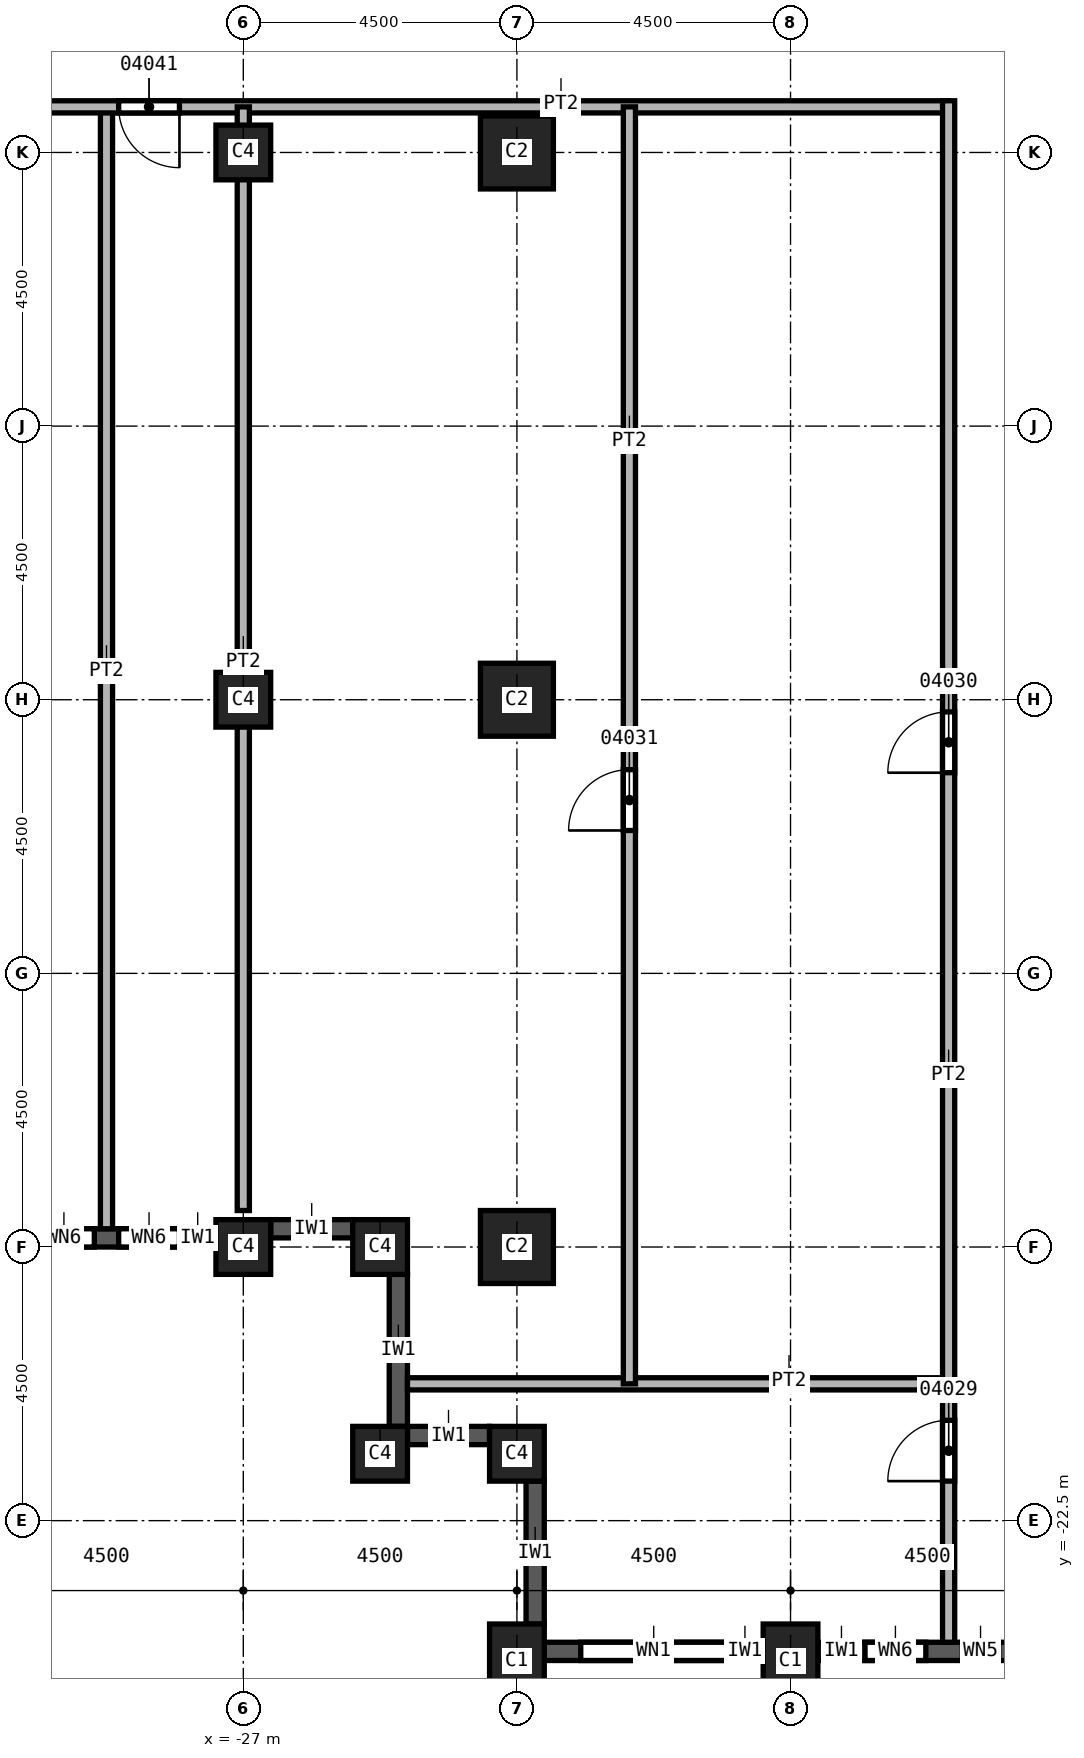
"""IFC4 building model, lengths in metres.
Left out: names, types, materials, properties, quantities, classifications, styles, units other than length and angle.
Written with IfcOpenShell. Run it as: python <this file> out.ifc"""

import sys

from ifc_helpers import new_model, si_unit, direction, frame, frame_2d, origin, origin_2d, place, context, subcontext, project, spatial, rectangle, extrude, element, fill, save


model = new_model("IFC4")
c1 = context("Model", 3, precision=1e-05, world=origin(), true_north=direction((0.0, 1.0)))
c2 = subcontext(c1, "Body", "Model", "MODEL_VIEW")
j1 = project(units=[si_unit("LENGTHUNIT", "METRE"), si_unit("PLANEANGLEUNIT", "RADIAN")], contexts=[c1])
p1 = place(None, origin())
s1 = spatial("IfcSite", under=j1, at=p1, CompositionType="ELEMENT")
p2 = place(p1, origin())
s2 = spatial("IfcBuilding", under=s1, at=p2, CompositionType="ELEMENT")
p3 = place(p2, frame((0.0, 0.0, 104.0)))
s3 = spatial("IfcBuildingStorey", under=s2, at=p3, CompositionType="ELEMENT", Elevation=104.0)
for number, where, z_axis, x_axis in (
    (1, (-22.5, 0.0, 0.0), (0.0, 0.0, 1.0), (1.0, 0.0, 0.0)),
    (2, (-22.5, -9.0, 0.0), (0.0, 0.0, 1.0), (1.0, 0.0, 0.0)),
    (3, (-22.5, -18.0, 0.0), (0.0, 0.0, 1.0), (1.0, 0.0, 0.0)),
):
    element("IfcColumn", number, at=place(p3, frame(where, z_axis=z_axis, x_axis=x_axis)), inside=s3, PredefinedType="COLUMN", context=c2, shape_type="SweptSolid", body=[
        extrude(rectangle(XDim=1.2, YDim=1.2, at=origin_2d()), origin(), (0.0, 0.0, 1.0), 3.7),
    ])
for number, where, z_axis, x_axis in (
    (4, (-18.0, -24.8, 0.0), (0.0, 0.0, 1.0), (1.0, 0.0, 0.0)),
    (5, (-22.5, -24.8, 0.0), (0.0, 0.0, 1.0), (1.0, 0.0, 0.0)),
):
    element("IfcColumn", number, at=place(p3, frame(where, z_axis=z_axis, x_axis=x_axis)), inside=s3, PredefinedType="COLUMN", context=c2, shape_type="SweptSolid", body=[
        extrude(rectangle(XDim=0.9, YDim=1.2, at=origin_2d()), origin(), (0.0, 0.0, 1.0), 3.7),
    ])
for number, where, z_axis, x_axis in (
    (6, (-27.0, 0.0, 0.0), (0.0, 0.0, 1.0), (1.0, 0.0, 0.0)),
    (7, (-27.0, -9.0, 0.0), (0.0, 0.0, 1.0), (1.0, 0.0, 0.0)),
    (8, (-27.0, -18.0, 0.0), (0.0, 0.0, 1.0), (1.0, 0.0, 0.0)),
    (9, (-22.5, -21.4, 0.0), (0.0, 0.0, 1.0), (1.0, 0.0, 0.0)),
    (10, (-24.75, -21.4, 0.0), (0.0, 0.0, 1.0), (1.0, 0.0, 0.0)),
    (11, (-24.75, -18.0, 0.0), (0.0, 0.0, 1.0), (1.0, 0.0, 0.0)),
):
    element("IfcColumn", number, at=place(p3, frame(where, z_axis=z_axis, x_axis=x_axis)), inside=s3, PredefinedType="COLUMN", context=c2, shape_type="SweptSolid", body=[
        extrude(rectangle(XDim=0.9, YDim=0.9, at=origin_2d()), origin(), (0.0, 0.0, 1.0), 3.7),
    ])
p4 = place(p3, frame((-31.05, -17.85, 0.0), z_axis=(0.0, 0.0, 1.0), x_axis=(1.0, 0.0, 0.0)))
e12 = element("IfcWall", 12, at=p4, inside=s3, PredefinedType="SOLIDWALL", context=c2, shape_type="SweptSolid", body=[
    extrude(rectangle(XDim=3.6, YDim=0.3, at=frame_2d((1.8, 0.0))), origin(), (0.0, 0.0, 1.0), 3.1),
])
p5 = place(p4, frame((0.6, 0.0, 0.8)))
e13 = element("IfcOpeningElement", 13, at=p5, cuts=e12, PredefinedType="OPENING", context=c2, shape_type="SweptSolid", body=[
    extrude(rectangle(XDim=1.0, YDim=1.95, at=frame_2d((0.5, 0.975))), frame((0.0, 0.15, 0.0), z_axis=(0.0, -1.0, 0.0), x_axis=(1.0, 0.0, 0.0)), (0.0, 0.0, 1.0), 0.3),
])
p6 = place(p4, frame((2.0, 0.0, 0.8)))
e14 = element("IfcOpeningElement", 14, at=p6, cuts=e12, PredefinedType="OPENING", context=c2, shape_type="SweptSolid", body=[
    extrude(rectangle(XDim=1.0, YDim=1.95, at=frame_2d((0.5, 0.975))), frame((0.0, 0.15, 0.0), z_axis=(0.0, -1.0, 0.0), x_axis=(1.0, 0.0, 0.0)), (0.0, 0.0, 1.0), 0.3),
])
p7 = place(p3, frame((-26.55, -17.7, 0.0), z_axis=(0.0, 0.0, 1.0), x_axis=(1.0, 0.0, 0.0)))
e15 = element("IfcWall", 15, at=p7, inside=s3, PredefinedType="SOLIDWALL", context=c2, shape_type="SweptSolid", body=[
    extrude(rectangle(XDim=1.35, YDim=0.3, at=frame_2d((0.675, 0.0))), origin(), (0.0, 0.0, 1.0), 3.1),
])
p8 = place(p3, frame((-24.45, -18.45, 0.0), z_axis=(0.0, 0.0, 1.0), x_axis=(0.0, -1.0, 0.0)))
e16 = element("IfcWall", 16, at=p8, inside=s3, PredefinedType="SOLIDWALL", context=c2, shape_type="SweptSolid", body=[
    extrude(rectangle(XDim=2.5, YDim=0.3, at=frame_2d((1.25, 0.0))), origin(), (0.0, 0.0, 1.0), 3.1),
])
p9 = place(p3, frame((-24.3, -21.1, 0.0), z_axis=(0.0, 0.0, 1.0), x_axis=(1.0, 0.0, 0.0)))
e17 = element("IfcWall", 17, at=p9, inside=s3, PredefinedType="SOLIDWALL", context=c2, shape_type="SweptSolid", body=[
    extrude(rectangle(XDim=1.35, YDim=0.3, at=frame_2d((0.675, 0.0))), origin(), (0.0, 0.0, 1.0), 3.1),
])
p10 = place(p3, frame((-22.2, -21.85, 0.0), z_axis=(0.0, 0.0, 1.0), x_axis=(0.0, -1.0, 0.0)))
e18 = element("IfcWall", 18, at=p10, inside=s3, PredefinedType="SOLIDWALL", context=c2, shape_type="SweptSolid", body=[
    extrude(rectangle(XDim=2.35, YDim=0.3, at=frame_2d((1.175, 0.0))), origin(), (0.0, 0.0, 1.0), 3.1),
])
p11 = place(p3, frame((-22.05, -24.65, 0.0), z_axis=(0.0, 0.0, 1.0), x_axis=(1.0, 0.0, 0.0)))
e19 = element("IfcWall", 19, at=p11, inside=s3, PredefinedType="SOLIDWALL", context=c2, shape_type="SweptSolid", body=[
    extrude(rectangle(XDim=3.6, YDim=0.3, at=frame_2d((1.8, 0.0))), origin(), (0.0, 0.0, 1.0), 3.1),
])
p12 = place(p11, frame((0.6, 0.0, 0.8)))
e20 = element("IfcOpeningElement", 20, at=p12, cuts=e19, PredefinedType="OPENING", context=c2, shape_type="SweptSolid", body=[
    extrude(rectangle(XDim=2.4, YDim=1.95, at=frame_2d((1.2, 0.975))), frame((0.0, 0.15, 0.0), z_axis=(0.0, -1.0, 0.0), x_axis=(1.0, 0.0, 0.0)), (0.0, 0.0, 1.0), 0.3),
])
p13 = place(p3, frame((-17.55, -24.65, 0.0), z_axis=(0.0, 0.0, 1.0), x_axis=(1.0, 0.0, 0.0)))
e21 = element("IfcWall", 21, at=p13, inside=s3, PredefinedType="SOLIDWALL", context=c2, shape_type="SweptSolid", body=[
    extrude(rectangle(XDim=3.6, YDim=0.3, at=frame_2d((1.8, 0.0))), origin(), (0.0, 0.0, 1.0), 3.1),
])
p14 = place(p13, frame((0.775, 0.0, 0.8)))
e22 = element("IfcOpeningElement", 22, at=p14, cuts=e21, PredefinedType="OPENING", context=c2, shape_type="SweptSolid", body=[
    extrude(rectangle(XDim=1.0, YDim=1.95, at=frame_2d((0.5, 0.975))), frame((0.0, 0.15, 0.0), z_axis=(0.0, -1.0, 0.0), x_axis=(1.0, 0.0, 0.0)), (0.0, 0.0, 1.0), 0.3),
])
p15 = place(p13, frame((2.375, 0.0, 0.8)))
e23 = element("IfcOpeningElement", 23, at=p15, cuts=e21, PredefinedType="OPENING", context=c2, shape_type="SweptSolid", body=[
    extrude(rectangle(XDim=0.6, YDim=1.95, at=frame_2d((0.3, 0.975))), frame((0.0, 0.15, 0.0), z_axis=(0.0, -1.0, 0.0), x_axis=(1.0, 0.0, 0.0)), (0.0, 0.0, 1.0), 0.3),
])
p16 = place(p3, frame((-29.25, 0.75, 0.0), z_axis=(0.0, 0.0, 1.0), x_axis=(0.0, -1.0, 0.0)))
e24 = element("IfcWall", 24, at=p16, inside=s3, PredefinedType="PARTITIONING", context=c2, shape_type="SweptSolid", body=[
    extrude(rectangle(XDim=18.45, YDim=0.2, at=frame_2d((9.225, 0.0))), origin(), (0.0, 0.0, 1.0), 3.7),
])
p17 = place(p3, frame((-15.4, 0.75, 0.0), z_axis=(0.0, 0.0, 1.0), x_axis=(-1.0, 0.0, 0.0)))
e25 = element("IfcWall", 25, at=p17, inside=s3, PredefinedType="PARTITIONING", context=c2, shape_type="SweptSolid", body=[
    extrude(rectangle(XDim=18.45, YDim=0.2, at=frame_2d((9.225, 0.0))), origin(), (0.0, 0.0, 1.0), 3.7),
])
p18 = place(p17, frame((12.65, 0.0, 0.0)))
e26 = element("IfcOpeningElement", 26, at=p18, cuts=e25, PredefinedType="OPENING", context=c2, shape_type="SweptSolid", body=[
    extrude(rectangle(XDim=1.0, YDim=2.1, at=frame_2d((0.5, 1.05))), frame((0.0, 0.1, 0.0), z_axis=(0.0, -1.0, 0.0), x_axis=(1.0, 0.0, 0.0)), (0.0, 0.0, 1.0), 0.2),
])
p19 = place(p3, frame((-27.0, -17.4, 0.0), z_axis=(0.0, 0.0, 1.0), x_axis=(0.0, 1.0, 0.0)))
e27 = element("IfcWall", 27, at=p19, inside=s3, PredefinedType="PARTITIONING", context=c2, shape_type="SweptSolid", body=[
    extrude(rectangle(XDim=18.15, YDim=0.2, at=frame_2d((9.075, 0.0))), origin(), (0.0, 0.0, 1.0), 3.7),
])
p20 = place(p3, frame((-24.3, -20.25, 0.0), z_axis=(0.0, 0.0, 1.0), x_axis=(1.0, 0.0, 0.0)))
e28 = element("IfcWall", 28, at=p20, inside=s3, PredefinedType="PARTITIONING", context=c2, shape_type="SweptSolid", body=[
    extrude(rectangle(XDim=8.9, YDim=0.2, at=frame_2d((4.45, 0.0))), origin(), (0.0, 0.0, 1.0), 3.7),
])
p21 = place(p3, frame((-20.65, -20.25, 0.0), z_axis=(0.0, 0.0, 1.0), x_axis=(0.0, 1.0, 0.0)))
e29 = element("IfcWall", 29, at=p21, inside=s3, PredefinedType="PARTITIONING", context=c2, shape_type="SweptSolid", body=[
    extrude(rectangle(XDim=21.0, YDim=0.2, at=frame_2d((10.5, 0.0))), origin(), (0.0, 0.0, 1.0), 3.7),
])
p22 = place(p21, frame((9.1, 0.0, 0.0)))
e30 = element("IfcOpeningElement", 30, at=p22, cuts=e29, PredefinedType="OPENING", context=c2, shape_type="SweptSolid", body=[
    extrude(rectangle(XDim=1.0, YDim=2.1, at=frame_2d((0.5, 1.05))), frame((0.0, 0.1, 0.0), z_axis=(0.0, -1.0, 0.0), x_axis=(1.0, 0.0, 0.0)), (0.0, 0.0, 1.0), 0.2),
])
p23 = place(p3, frame((-15.4, -24.5, 0.0), z_axis=(0.0, 0.0, 1.0), x_axis=(0.0, 1.0, 0.0)))
e31 = element("IfcWall", 31, at=p23, inside=s3, PredefinedType="PARTITIONING", context=c2, shape_type="SweptSolid", body=[
    extrude(rectangle(XDim=25.35, YDim=0.2, at=frame_2d((12.675, 0.0))), origin(), (0.0, 0.0, 1.0), 3.7),
])
p24 = place(p23, frame((2.65, 0.0, 0.0)))
e32 = element("IfcOpeningElement", 32, at=p24, cuts=e31, PredefinedType="OPENING", context=c2, shape_type="SweptSolid", body=[
    extrude(rectangle(XDim=1.0, YDim=2.1, at=frame_2d((0.5, 1.05))), frame((0.0, 0.1, 0.0), z_axis=(0.0, -1.0, 0.0), x_axis=(1.0, 0.0, 0.0)), (0.0, 0.0, 1.0), 0.2),
])
p25 = place(p23, frame((14.3, 0.0, 0.0)))
e33 = element("IfcOpeningElement", 33, at=p25, cuts=e31, PredefinedType="OPENING", context=c2, shape_type="SweptSolid", body=[
    extrude(rectangle(XDim=1.0, YDim=2.1, at=frame_2d((0.5, 1.05))), frame((0.0, 0.1, 0.0), z_axis=(0.0, -1.0, 0.0), x_axis=(1.0, 0.0, 0.0)), (0.0, 0.0, 1.0), 0.2),
])
p26 = place(p12, origin())
e34 = element("IfcWindow", 34, at=p26, inside=s3, PartitioningType="SINGLE_PANEL", PredefinedType="WINDOW", context=c2, shape_type="SweptSolid", body=[
    extrude(rectangle(XDim=2.4, YDim=1.95, at=frame_2d((1.2, 0.975))), frame((0.0, 0.03, 0.0), z_axis=(0.0, -1.0, 0.0), x_axis=(1.0, 0.0, 0.0)), (0.0, 0.0, 1.0), 0.06),
])
fill(e20, e34)
p27 = place(p24, origin())
e35 = element("IfcDoor", 35, at=p27, inside=s3, OperationType="SINGLE_SWING_RIGHT", PredefinedType="DOOR", context=c2, shape_type="SweptSolid", body=[
    extrude(rectangle(XDim=1.0, YDim=2.1, at=frame_2d((0.5, 1.05))), frame((0.0, 0.025, 0.0), z_axis=(0.0, -1.0, 0.0), x_axis=(1.0, 0.0, 0.0)), (0.0, 0.0, 1.0), 0.05),
])
fill(e32, e35)
p28 = place(p25, origin())
e36 = element("IfcDoor", 36, at=p28, inside=s3, OperationType="SINGLE_SWING_LEFT", PredefinedType="DOOR", context=c2, shape_type="SweptSolid", body=[
    extrude(rectangle(XDim=1.0, YDim=2.1, at=frame_2d((0.5, 1.05))), frame((0.0, 0.025, 0.0), z_axis=(0.0, -1.0, 0.0), x_axis=(1.0, 0.0, 0.0)), (0.0, 0.0, 1.0), 0.05),
])
fill(e33, e36)
p29 = place(p22, origin())
e37 = element("IfcDoor", 37, at=p29, inside=s3, OperationType="SINGLE_SWING_RIGHT", PredefinedType="DOOR", context=c2, shape_type="SweptSolid", body=[
    extrude(rectangle(XDim=1.0, YDim=2.1, at=frame_2d((0.5, 1.05))), frame((0.0, 0.025, 0.0), z_axis=(0.0, -1.0, 0.0), x_axis=(1.0, 0.0, 0.0)), (0.0, 0.0, 1.0), 0.05),
])
fill(e30, e37)
p30 = place(p18, origin())
e38 = element("IfcDoor", 38, at=p30, inside=s3, OperationType="SINGLE_SWING_RIGHT", PredefinedType="DOOR", context=c2, shape_type="SweptSolid", body=[
    extrude(rectangle(XDim=1.0, YDim=2.1, at=frame_2d((0.5, 1.05))), frame((0.0, 0.025, 0.0), z_axis=(0.0, -1.0, 0.0), x_axis=(1.0, 0.0, 0.0)), (0.0, 0.0, 1.0), 0.05),
])
fill(e26, e38)
p31 = place(p5, origin())
e39 = element("IfcWindow", 39, at=p31, inside=s3, PartitioningType="SINGLE_PANEL", PredefinedType="WINDOW", context=c2, shape_type="SweptSolid", body=[
    extrude(rectangle(XDim=1.0, YDim=1.95, at=frame_2d((0.5, 0.975))), frame((0.0, 0.03, 0.0), z_axis=(0.0, -1.0, 0.0), x_axis=(1.0, 0.0, 0.0)), (0.0, 0.0, 1.0), 0.06),
])
fill(e13, e39)
p32 = place(p6, origin())
e40 = element("IfcWindow", 40, at=p32, inside=s3, PartitioningType="SINGLE_PANEL", PredefinedType="WINDOW", context=c2, shape_type="SweptSolid", body=[
    extrude(rectangle(XDim=1.0, YDim=1.95, at=frame_2d((0.5, 0.975))), frame((0.0, 0.03, 0.0), z_axis=(0.0, -1.0, 0.0), x_axis=(1.0, 0.0, 0.0)), (0.0, 0.0, 1.0), 0.06),
])
fill(e14, e40)
p33 = place(p14, origin())
e41 = element("IfcWindow", 41, at=p33, inside=s3, PartitioningType="SINGLE_PANEL", PredefinedType="WINDOW", context=c2, shape_type="SweptSolid", body=[
    extrude(rectangle(XDim=1.0, YDim=1.95, at=frame_2d((0.5, 0.975))), frame((0.0, 0.03, 0.0), z_axis=(0.0, -1.0, 0.0), x_axis=(1.0, 0.0, 0.0)), (0.0, 0.0, 1.0), 0.06),
])
fill(e22, e41)
p34 = place(p15, origin())
e42 = element("IfcWindow", 42, at=p34, inside=s3, PartitioningType="SINGLE_PANEL", PredefinedType="WINDOW", context=c2, shape_type="SweptSolid", body=[
    extrude(rectangle(XDim=0.6, YDim=1.95, at=frame_2d((0.3, 0.975))), frame((0.0, 0.03, 0.0), z_axis=(0.0, -1.0, 0.0), x_axis=(1.0, 0.0, 0.0)), (0.0, 0.0, 1.0), 0.06),
])
fill(e23, e42)
save(model, sys.argv[1])
